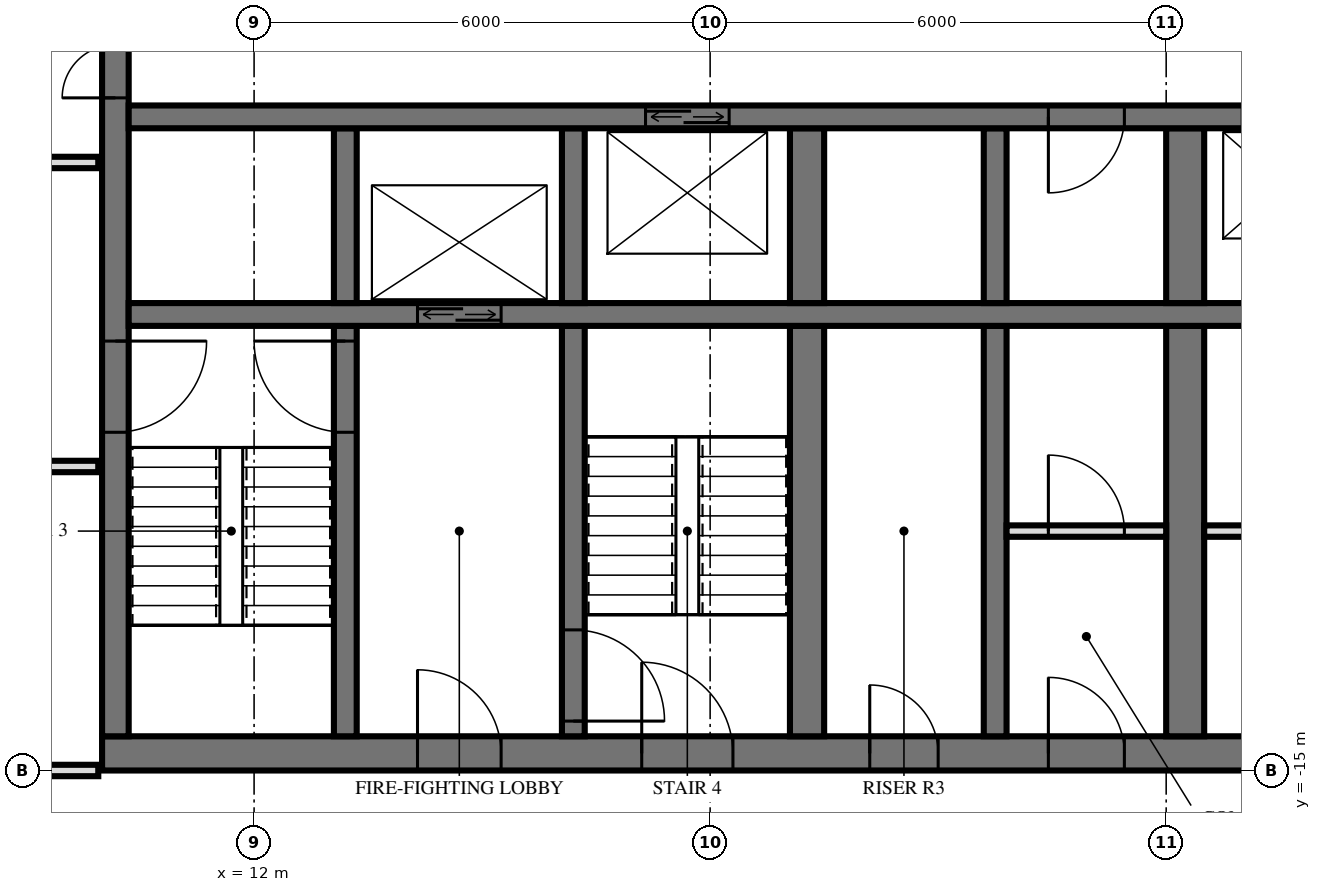
"""IFC4 building model, lengths in metres.
Left out: names, types, materials, properties, quantities, classifications, styles, units other than length and angle.
Written with IfcOpenShell. Run it as: python <this file> out.ifc"""

import sys

from ifc_helpers import new_model, si_unit, direction, frame, frame_2d, origin, place, context, subcontext, project, spatial, rectangle, extrude, element, fill, save


model = new_model("IFC4")
c1 = context("Model", 3, precision=1e-05, world=origin(), true_north=direction((0.0, 1.0)))
c2 = subcontext(c1, "Body", "Model", "MODEL_VIEW")
j1 = project(units=[si_unit("LENGTHUNIT", "METRE"), si_unit("PLANEANGLEUNIT", "RADIAN")], contexts=[c1])
p1 = place(None, origin())
s1 = spatial("IfcSite", under=j1, at=p1, CompositionType="ELEMENT")
p2 = place(p1, origin())
s2 = spatial("IfcBuilding", under=s1, at=p2, CompositionType="ELEMENT")
p3 = place(p2, frame((0.0, 0.0, 27.6)))
s3 = spatial("IfcBuildingStorey", under=s2, at=p3, CompositionType="ELEMENT", Elevation=27.6)
p4 = place(p3, frame((10.0, -14.775, 0.0), z_axis=(0.0, 0.0, 1.0), x_axis=(1.0, 0.0, 0.0)))
e1 = element("IfcWall", 1, at=p4, inside=s3, PredefinedType="SHEAR", context=c2, shape_type="SweptSolid", body=[
    extrude(rectangle(XDim=19.5, YDim=0.45, at=frame_2d((9.75, 0.0))), origin(), (0.0, 0.0, 1.0), 3.6),
])
p5 = place(p4, frame((7.1, 0.0, 0.0)))
e2 = element("IfcOpeningElement", 2, at=p5, cuts=e1, PredefinedType="OPENING", context=c2, shape_type="SweptSolid", body=[
    extrude(rectangle(XDim=1.2, YDim=2.1, at=frame_2d((0.6, 1.05))), frame((0.0, 0.235, 0.0), z_axis=(0.0, -1.0, 0.0), x_axis=(1.0, 0.0, 0.0)), (0.0, 0.0, 1.0), 0.47),
])
p6 = place(p4, frame((4.15, 0.0, 0.0)))
e3 = element("IfcOpeningElement", 3, at=p6, cuts=e1, PredefinedType="OPENING", context=c2, shape_type="SweptSolid", body=[
    extrude(rectangle(XDim=1.1, YDim=2.1, at=frame_2d((0.55, 1.05))), frame((0.0, 0.235, 0.0), z_axis=(0.0, -1.0, 0.0), x_axis=(1.0, 0.0, 0.0)), (0.0, 0.0, 1.0), 0.47),
])
p7 = place(p4, frame((10.1, 0.0, 0.0)))
e4 = element("IfcOpeningElement", 4, at=p7, cuts=e1, PredefinedType="OPENING", context=c2, shape_type="SweptSolid", body=[
    extrude(rectangle(XDim=0.9, YDim=2.1, at=frame_2d((0.45, 1.05))), frame((0.0, 0.235, 0.0), z_axis=(0.0, -1.0, 0.0), x_axis=(1.0, 0.0, 0.0)), (0.0, 0.0, 1.0), 0.47),
])
p8 = place(p4, frame((12.45, 0.0, 0.0)))
e5 = element("IfcOpeningElement", 5, at=p8, cuts=e1, PredefinedType="OPENING", context=c2, shape_type="SweptSolid", body=[
    extrude(rectangle(XDim=1.0, YDim=2.1, at=frame_2d((0.5, 1.05))), frame((0.0, 0.235, 0.0), z_axis=(0.0, -1.0, 0.0), x_axis=(1.0, 0.0, 0.0)), (0.0, 0.0, 1.0), 0.47),
])
p9 = place(p4, frame((16.25, 0.0, 0.0)))
e6 = element("IfcOpeningElement", 6, at=p9, cuts=e1, PredefinedType="OPENING", context=c2, shape_type="SweptSolid", body=[
    extrude(rectangle(XDim=1.0, YDim=2.1, at=frame_2d((0.5, 1.05))), frame((0.0, 0.235, 0.0), z_axis=(0.0, -1.0, 0.0), x_axis=(1.0, 0.0, 0.0)), (0.0, 0.0, 1.0), 0.47),
])
p10 = place(p3, frame((10.175, -14.55, 0.0), z_axis=(0.0, 0.0, 1.0), x_axis=(0.0, 1.0, 0.0)))
e7 = element("IfcWall", 7, at=p10, inside=s3, PredefinedType="SHEAR", context=c2, shape_type="SweptSolid", body=[
    extrude(rectangle(XDim=14.1, YDim=0.35, at=frame_2d((7.05, 0.0))), origin(), (0.0, 0.0, 1.0), 3.6),
])
p11 = place(p10, frame((8.4, 0.0, 0.0)))
e8 = element("IfcOpeningElement", 8, at=p11, cuts=e7, PredefinedType="OPENING", context=c2, shape_type="SweptSolid", body=[
    extrude(rectangle(XDim=1.4, YDim=2.4, at=frame_2d((0.7, 1.2))), frame((0.0, 0.185, 0.0), z_axis=(0.0, -1.0, 0.0), x_axis=(1.0, 0.0, 0.0)), (0.0, 0.0, 1.0), 0.37),
])
p12 = place(p10, frame((10.0, 0.0, 0.0)))
e9 = element("IfcOpeningElement", 9, at=p12, cuts=e7, PredefinedType="OPENING", context=c2, shape_type="SweptSolid", body=[
    extrude(rectangle(XDim=1.4, YDim=2.4, at=frame_2d((0.7, 1.2))), frame((0.0, 0.185, 0.0), z_axis=(0.0, -1.0, 0.0), x_axis=(1.0, 0.0, 0.0)), (0.0, 0.0, 1.0), 0.37),
])
p13 = place(p10, frame((4.0, 0.0, 0.0)))
e10 = element("IfcOpeningElement", 10, at=p13, cuts=e7, PredefinedType="OPENING", context=c2, shape_type="SweptSolid", body=[
    extrude(rectangle(XDim=1.2, YDim=2.1, at=frame_2d((0.6, 1.05))), frame((0.0, 0.185, 0.0), z_axis=(0.0, -1.0, 0.0), x_axis=(1.0, 0.0, 0.0)), (0.0, 0.0, 1.0), 0.37),
])
p14 = place(p3, frame((10.35, -6.4, 0.0), z_axis=(0.0, 0.0, 1.0), x_axis=(1.0, 0.0, 0.0)))
e11 = element("IfcWall", 11, at=p14, inside=s3, PredefinedType="SHEAR", context=c2, shape_type="SweptSolid", body=[
    extrude(rectangle(XDim=18.7, YDim=0.3, at=frame_2d((9.35, 0.0))), origin(), (0.0, 0.0, 1.0), 3.6),
])
p15 = place(p14, frame((14.65, 0.0, 0.0)))
e12 = element("IfcOpeningElement", 12, at=p15, cuts=e11, PredefinedType="OPENING", context=c2, shape_type="SweptSolid", body=[
    extrude(rectangle(XDim=1.1, YDim=2.1, at=frame_2d((0.55, 1.05))), frame((0.0, 0.16, 0.0), z_axis=(0.0, -1.0, 0.0), x_axis=(1.0, 0.0, 0.0)), (0.0, 0.0, 1.0), 0.32),
])
p16 = place(p14, frame((17.05, 0.0, 0.0)))
e13 = element("IfcOpeningElement", 13, at=p16, cuts=e11, PredefinedType="OPENING", context=c2, shape_type="SweptSolid", body=[
    extrude(rectangle(XDim=1.1, YDim=2.1, at=frame_2d((0.55, 1.05))), frame((0.0, 0.16, 0.0), z_axis=(0.0, -1.0, 0.0), x_axis=(1.0, 0.0, 0.0)), (0.0, 0.0, 1.0), 0.32),
])
p17 = place(p14, frame((6.8, 0.0, 0.0)))
e14 = element("IfcOpeningElement", 14, at=p17, cuts=e11, PredefinedType="OPENING", context=c2, shape_type="SweptSolid", body=[
    extrude(rectangle(XDim=1.1, YDim=2.1, at=frame_2d((0.55, 1.05))), frame((0.0, 0.16, 0.0), z_axis=(0.0, -1.0, 0.0), x_axis=(1.0, 0.0, 0.0)), (0.0, 0.0, 1.0), 0.32),
])
p18 = place(p14, frame((12.1, 0.0, 0.0)))
e15 = element("IfcOpeningElement", 15, at=p18, cuts=e11, PredefinedType="OPENING", context=c2, shape_type="SweptSolid", body=[
    extrude(rectangle(XDim=1.0, YDim=2.1, at=frame_2d((0.5, 1.05))), frame((0.0, 0.16, 0.0), z_axis=(0.0, -1.0, 0.0), x_axis=(1.0, 0.0, 0.0)), (0.0, 0.0, 1.0), 0.32),
])
p19 = place(p3, frame((10.35, -9.0, 0.0), z_axis=(0.0, 0.0, 1.0), x_axis=(1.0, 0.0, 0.0)))
e16 = element("IfcWall", 16, at=p19, inside=s3, PredefinedType="SHEAR", context=c2, shape_type="SweptSolid", body=[
    extrude(rectangle(XDim=18.7, YDim=0.3, at=frame_2d((9.35, 0.0))), origin(), (0.0, 0.0, 1.0), 3.6),
])
p20 = place(p19, frame((3.8, 0.0, 0.0)))
e17 = element("IfcOpeningElement", 17, at=p20, cuts=e16, PredefinedType="OPENING", context=c2, shape_type="SweptSolid", body=[
    extrude(rectangle(XDim=1.1, YDim=2.1, at=frame_2d((0.55, 1.05))), frame((0.0, 0.16, 0.0), z_axis=(0.0, -1.0, 0.0), x_axis=(1.0, 0.0, 0.0)), (0.0, 0.0, 1.0), 0.32),
])
p21 = place(p3, frame((13.2, -8.85, 0.0), z_axis=(0.0, 0.0, 1.0), x_axis=(0.0, 1.0, 0.0)))
e18 = element("IfcWall", 18, at=p21, inside=s3, PredefinedType="SHEAR", context=c2, shape_type="SweptSolid", body=[
    extrude(rectangle(XDim=2.3, YDim=0.3, at=frame_2d((1.15, 0.0))), origin(), (0.0, 0.0, 1.0), 3.6),
])
p22 = place(p3, frame((13.2, -14.55, 0.0), z_axis=(0.0, 0.0, 1.0), x_axis=(0.0, 1.0, 0.0)))
e19 = element("IfcWall", 19, at=p22, inside=s3, PredefinedType="SHEAR", context=c2, shape_type="SweptSolid", body=[
    extrude(rectangle(XDim=5.4, YDim=0.3, at=frame_2d((2.7, 0.0))), origin(), (0.0, 0.0, 1.0), 3.6),
])
p23 = place(p22, frame((4.0, 0.0, 0.0)))
e20 = element("IfcOpeningElement", 20, at=p23, cuts=e19, PredefinedType="OPENING", context=c2, shape_type="SweptSolid", body=[
    extrude(rectangle(XDim=1.2, YDim=2.1, at=frame_2d((0.6, 1.05))), frame((0.0, 0.16, 0.0), z_axis=(0.0, -1.0, 0.0), x_axis=(1.0, 0.0, 0.0)), (0.0, 0.0, 1.0), 0.32),
])
p24 = place(p3, frame((16.2, -8.85, 0.0), z_axis=(0.0, 0.0, 1.0), x_axis=(0.0, 1.0, 0.0)))
e21 = element("IfcWall", 21, at=p24, inside=s3, PredefinedType="SHEAR", context=c2, shape_type="SweptSolid", body=[
    extrude(rectangle(XDim=2.3, YDim=0.3, at=frame_2d((1.15, 0.0))), origin(), (0.0, 0.0, 1.0), 3.6),
])
p25 = place(p3, frame((16.2, -14.55, 0.0), z_axis=(0.0, 0.0, 1.0), x_axis=(0.0, 1.0, 0.0)))
e22 = element("IfcWall", 22, at=p25, inside=s3, PredefinedType="SHEAR", context=c2, shape_type="SweptSolid", body=[
    extrude(rectangle(XDim=5.4, YDim=0.3, at=frame_2d((2.7, 0.0))), origin(), (0.0, 0.0, 1.0), 3.6),
])
p26 = place(p25, frame((0.2, 0.0, 0.0)))
e23 = element("IfcOpeningElement", 23, at=p26, cuts=e22, PredefinedType="OPENING", context=c2, shape_type="SweptSolid", body=[
    extrude(rectangle(XDim=1.2, YDim=2.1, at=frame_2d((0.6, 1.05))), frame((0.0, 0.16, 0.0), z_axis=(0.0, -1.0, 0.0), x_axis=(1.0, 0.0, 0.0)), (0.0, 0.0, 1.0), 0.32),
])
p27 = place(p3, frame((19.275, -8.85, 0.0), z_axis=(0.0, 0.0, 1.0), x_axis=(0.0, 1.0, 0.0)))
e24 = element("IfcWall", 24, at=p27, inside=s3, PredefinedType="SHEAR", context=c2, shape_type="SweptSolid", body=[
    extrude(rectangle(XDim=2.3, YDim=0.45, at=frame_2d((1.15, 0.0))), origin(), (0.0, 0.0, 1.0), 3.6),
])
p28 = place(p3, frame((19.275, -14.55, 0.0), z_axis=(0.0, 0.0, 1.0), x_axis=(0.0, 1.0, 0.0)))
e25 = element("IfcWall", 25, at=p28, inside=s3, PredefinedType="SHEAR", context=c2, shape_type="SweptSolid", body=[
    extrude(rectangle(XDim=5.4, YDim=0.45, at=frame_2d((2.7, 0.0))), origin(), (0.0, 0.0, 1.0), 3.6),
])
p29 = place(p3, frame((21.75, -8.85, 0.0), z_axis=(0.0, 0.0, 1.0), x_axis=(0.0, 1.0, 0.0)))
e26 = element("IfcWall", 26, at=p29, inside=s3, PredefinedType="SHEAR", context=c2, shape_type="SweptSolid", body=[
    extrude(rectangle(XDim=2.3, YDim=0.3, at=frame_2d((1.15, 0.0))), origin(), (0.0, 0.0, 1.0), 3.6),
])
p30 = place(p3, frame((21.75, -14.55, 0.0), z_axis=(0.0, 0.0, 1.0), x_axis=(0.0, 1.0, 0.0)))
e27 = element("IfcWall", 27, at=p30, inside=s3, PredefinedType="SHEAR", context=c2, shape_type="SweptSolid", body=[
    extrude(rectangle(XDim=5.4, YDim=0.3, at=frame_2d((2.7, 0.0))), origin(), (0.0, 0.0, 1.0), 3.6),
])
p31 = place(p3, frame((24.25, -8.85, 0.0), z_axis=(0.0, 0.0, 1.0), x_axis=(0.0, 1.0, 0.0)))
e28 = element("IfcWall", 28, at=p31, inside=s3, PredefinedType="SHEAR", context=c2, shape_type="SweptSolid", body=[
    extrude(rectangle(XDim=2.3, YDim=0.5, at=frame_2d((1.15, 0.0))), origin(), (0.0, 0.0, 1.0), 3.6),
])
p32 = place(p3, frame((24.25, -14.55, 0.0), z_axis=(0.0, 0.0, 1.0), x_axis=(0.0, 1.0, 0.0)))
e29 = element("IfcWall", 29, at=p32, inside=s3, PredefinedType="SHEAR", context=c2, shape_type="SweptSolid", body=[
    extrude(rectangle(XDim=5.4, YDim=0.5, at=frame_2d((2.7, 0.0))), origin(), (0.0, 0.0, 1.0), 3.6),
])
p33 = place(p3, frame((21.9, -11.85, 0.0), z_axis=(0.0, 0.0, 1.0), x_axis=(1.0, 0.0, 0.0)))
e30 = element("IfcWall", 30, at=p33, inside=s3, PredefinedType="PARTITIONING", context=c2, shape_type="SweptSolid", body=[
    extrude(rectangle(XDim=2.1, YDim=0.15, at=frame_2d((1.05, 0.0))), origin(), (0.0, 0.0, 1.0), 3.3),
])
p34 = place(p33, frame((0.55, 0.0, 0.0)))
e31 = element("IfcOpeningElement", 31, at=p34, cuts=e30, PredefinedType="OPENING", context=c2, shape_type="SweptSolid", body=[
    extrude(rectangle(XDim=1.0, YDim=2.1, at=frame_2d((0.5, 1.05))), frame((0.0, 0.085, 0.0), z_axis=(0.0, -1.0, 0.0), x_axis=(1.0, 0.0, 0.0)), (0.0, 0.0, 1.0), 0.17),
])
p35 = place(p3, frame((24.5, -11.85, 0.0), z_axis=(0.0, 0.0, 1.0), x_axis=(1.0, 0.0, 0.0)))
e32 = element("IfcWall", 32, at=p35, inside=s3, PredefinedType="PARTITIONING", context=c2, shape_type="SweptSolid", body=[
    extrude(rectangle(XDim=4.5, YDim=0.15, at=frame_2d((2.25, 0.0))), origin(), (0.0, 0.0, 1.0), 3.3),
])
p36 = place(p35, frame((1.75, 0.0, 0.0)))
e33 = element("IfcOpeningElement", 33, at=p36, cuts=e32, PredefinedType="OPENING", context=c2, shape_type="SweptSolid", body=[
    extrude(rectangle(XDim=1.0, YDim=2.1, at=frame_2d((0.5, 1.05))), frame((0.0, 0.085, 0.0), z_axis=(0.0, -1.0, 0.0), x_axis=(1.0, 0.0, 0.0)), (0.0, 0.0, 1.0), 0.17),
])
p37 = place(p3, frame((-9.95, -15.0, 0.0), z_axis=(0.0, 0.0, 1.0), x_axis=(1.0, 0.0, 0.0)))
e34 = element("IfcWall", 34, at=p37, inside=s3, PredefinedType="PARTITIONING", context=c2, shape_type="SweptSolid", body=[
    extrude(rectangle(XDim=19.9, YDim=0.15, at=frame_2d((9.95, 0.0))), origin(), (0.0, 0.0, 1.0), 2.684),
])
p38 = place(p37, frame((9.45, 0.0, 0.0)))
e35 = element("IfcOpeningElement", 35, at=p38, cuts=e34, PredefinedType="OPENING", context=c2, shape_type="SweptSolid", body=[
    extrude(rectangle(XDim=1.0, YDim=2.1, at=frame_2d((0.5, 1.05))), frame((0.0, 0.085, 0.0), z_axis=(0.0, -1.0, 0.0), x_axis=(1.0, 0.0, 0.0)), (0.0, 0.0, 1.0), 0.17),
])
p39 = place(p3, frame((-9.95, -11.0, 0.0), z_axis=(0.0, 0.0, 1.0), x_axis=(1.0, 0.0, 0.0)))
e36 = element("IfcWall", 36, at=p39, inside=s3, PredefinedType="PARTITIONING", context=c2, shape_type="SweptSolid", body=[
    extrude(rectangle(XDim=19.9, YDim=0.15, at=frame_2d((9.95, 0.0))), origin(), (0.0, 0.0, 1.0), 3.32),
])
p40 = place(p39, frame((9.45, 0.0, 0.0)))
e37 = element("IfcOpeningElement", 37, at=p40, cuts=e36, PredefinedType="OPENING", context=c2, shape_type="SweptSolid", body=[
    extrude(rectangle(XDim=1.0, YDim=2.1, at=frame_2d((0.5, 1.05))), frame((0.0, 0.085, 0.0), z_axis=(0.0, -1.0, 0.0), x_axis=(1.0, 0.0, 0.0)), (0.0, 0.0, 1.0), 0.17),
])
p41 = place(p39, frame((15.45, 0.0, 0.0)))
e38 = element("IfcOpeningElement", 38, at=p41, cuts=e36, PredefinedType="OPENING", context=c2, shape_type="SweptSolid", body=[
    extrude(rectangle(XDim=1.0, YDim=2.1, at=frame_2d((0.5, 1.05))), frame((0.0, 0.085, 0.0), z_axis=(0.0, -1.0, 0.0), x_axis=(1.0, 0.0, 0.0)), (0.0, 0.0, 1.0), 0.17),
])
p42 = place(p3, frame((-9.95, -7.0, 0.0), z_axis=(0.0, 0.0, 1.0), x_axis=(1.0, 0.0, 0.0)))
e39 = element("IfcWall", 39, at=p42, inside=s3, PredefinedType="PARTITIONING", context=c2, shape_type="SweptSolid", body=[
    extrude(rectangle(XDim=19.9, YDim=0.15, at=frame_2d((9.95, 0.0))), origin(), (0.0, 0.0, 1.0), 3.32),
])
p43 = place(p42, frame((9.45, 0.0, 0.0)))
e40 = element("IfcOpeningElement", 40, at=p43, cuts=e39, PredefinedType="OPENING", context=c2, shape_type="SweptSolid", body=[
    extrude(rectangle(XDim=1.0, YDim=2.1, at=frame_2d((0.5, 1.05))), frame((0.0, 0.085, 0.0), z_axis=(0.0, -1.0, 0.0), x_axis=(1.0, 0.0, 0.0)), (0.0, 0.0, 1.0), 0.17),
])
p44 = place(p42, frame((3.45, 0.0, 0.0)))
e41 = element("IfcOpeningElement", 41, at=p44, cuts=e39, PredefinedType="OPENING", context=c2, shape_type="SweptSolid", body=[
    extrude(rectangle(XDim=1.0, YDim=2.1, at=frame_2d((0.5, 1.05))), frame((0.0, 0.085, 0.0), z_axis=(0.0, -1.0, 0.0), x_axis=(1.0, 0.0, 0.0)), (0.0, 0.0, 1.0), 0.17),
])
p45 = place(p20, origin())
e42 = element("IfcDoor", 42, at=p45, inside=s3, OperationType="DOUBLE_DOOR_SLIDING", PredefinedType="USERDEFINED", context=c2, shape_type="SweptSolid", body=[
    extrude(rectangle(XDim=1.1, YDim=2.1, at=frame_2d((0.55, 1.05))), frame((0.0, 0.025, 0.0), z_axis=(0.0, -1.0, 0.0), x_axis=(1.0, 0.0, 0.0)), (0.0, 0.0, 1.0), 0.05),
])
fill(e17, e42)
p46 = place(p17, origin())
e43 = element("IfcDoor", 43, at=p46, inside=s3, OperationType="DOUBLE_DOOR_SLIDING", PredefinedType="USERDEFINED", context=c2, shape_type="SweptSolid", body=[
    extrude(rectangle(XDim=1.1, YDim=2.1, at=frame_2d((0.55, 1.05))), frame((0.0, 0.025, 0.0), z_axis=(0.0, -1.0, 0.0), x_axis=(1.0, 0.0, 0.0)), (0.0, 0.0, 1.0), 0.05),
])
fill(e14, e43)
p47 = place(p11, origin())
e44 = element("IfcDoor", 44, at=p47, inside=s3, OperationType="DOUBLE_DOOR_SINGLE_SWING", PredefinedType="DOOR", context=c2, shape_type="SweptSolid", body=[
    extrude(rectangle(XDim=1.4, YDim=2.4, at=frame_2d((0.7, 1.2))), frame((0.0, 0.025, 0.0), z_axis=(0.0, -1.0, 0.0), x_axis=(1.0, 0.0, 0.0)), (0.0, 0.0, 1.0), 0.05),
])
fill(e8, e44)
p48 = place(p13, frame((0.6, 0.0, 0.0), z_axis=(0.0, 0.0, 1.0), x_axis=(-1.0, 0.0, 0.0)))
e45 = element("IfcDoor", 45, at=p48, inside=s3, OperationType="SINGLE_SWING_RIGHT", PredefinedType="DOOR", context=c2, shape_type="SweptSolid", body=[
    extrude(rectangle(XDim=1.2, YDim=2.1, at=frame_2d((0.0, 1.05))), frame((0.0, -0.025, 0.0), z_axis=(0.0, 1.0, 0.0), x_axis=(-1.0, 0.0, 0.0)), (0.0, 0.0, 1.0), 0.05),
])
fill(e10, e45)
p49 = place(p5, origin())
e46 = element("IfcDoor", 46, at=p49, inside=s3, OperationType="SINGLE_SWING_RIGHT", PredefinedType="DOOR", context=c2, shape_type="SweptSolid", body=[
    extrude(rectangle(XDim=1.2, YDim=2.1, at=frame_2d((0.6, 1.05))), frame((0.0, 0.025, 0.0), z_axis=(0.0, -1.0, 0.0), x_axis=(1.0, 0.0, 0.0)), (0.0, 0.0, 1.0), 0.05),
])
fill(e2, e46)
p50 = place(p6, origin())
e47 = element("IfcDoor", 47, at=p50, inside=s3, OperationType="SINGLE_SWING_RIGHT", PredefinedType="DOOR", context=c2, shape_type="SweptSolid", body=[
    extrude(rectangle(XDim=1.1, YDim=2.1, at=frame_2d((0.55, 1.05))), frame((0.0, 0.025, 0.0), z_axis=(0.0, -1.0, 0.0), x_axis=(1.0, 0.0, 0.0)), (0.0, 0.0, 1.0), 0.05),
])
fill(e3, e47)
p51 = place(p7, origin())
e48 = element("IfcDoor", 48, at=p51, inside=s3, OperationType="SINGLE_SWING_RIGHT", PredefinedType="DOOR", context=c2, shape_type="SweptSolid", body=[
    extrude(rectangle(XDim=0.9, YDim=2.1, at=frame_2d((0.45, 1.05))), frame((0.0, 0.025, 0.0), z_axis=(0.0, -1.0, 0.0), x_axis=(1.0, 0.0, 0.0)), (0.0, 0.0, 1.0), 0.05),
])
fill(e4, e48)
p52 = place(p8, origin())
e49 = element("IfcDoor", 49, at=p52, inside=s3, OperationType="SINGLE_SWING_RIGHT", PredefinedType="DOOR", context=c2, shape_type="SweptSolid", body=[
    extrude(rectangle(XDim=1.0, YDim=2.1, at=frame_2d((0.5, 1.05))), frame((0.0, 0.025, 0.0), z_axis=(0.0, -1.0, 0.0), x_axis=(1.0, 0.0, 0.0)), (0.0, 0.0, 1.0), 0.05),
])
fill(e5, e49)
p53 = place(p18, frame((0.5, 0.0, 0.0), z_axis=(0.0, 0.0, 1.0), x_axis=(-1.0, 0.0, 0.0)))
e50 = element("IfcDoor", 50, at=p53, inside=s3, OperationType="SINGLE_SWING_LEFT", PredefinedType="DOOR", context=c2, shape_type="SweptSolid", body=[
    extrude(rectangle(XDim=1.0, YDim=2.1, at=frame_2d((0.0, 1.05))), frame((0.0, -0.025, 0.0), z_axis=(0.0, 1.0, 0.0), x_axis=(-1.0, 0.0, 0.0)), (0.0, 0.0, 1.0), 0.05),
])
fill(e15, e50)
p54 = place(p23, origin())
e51 = element("IfcDoor", 51, at=p54, inside=s3, OperationType="SINGLE_SWING_LEFT", PredefinedType="DOOR", context=c2, shape_type="SweptSolid", body=[
    extrude(rectangle(XDim=1.2, YDim=2.1, at=frame_2d((0.6, 1.05))), frame((0.0, 0.025, 0.0), z_axis=(0.0, -1.0, 0.0), x_axis=(1.0, 0.0, 0.0)), (0.0, 0.0, 1.0), 0.05),
])
fill(e20, e51)
p55 = place(p26, frame((0.6, 0.0, 0.0), z_axis=(0.0, 0.0, 1.0), x_axis=(-1.0, 0.0, 0.0)))
e52 = element("IfcDoor", 52, at=p55, inside=s3, OperationType="SINGLE_SWING_LEFT", PredefinedType="DOOR", context=c2, shape_type="SweptSolid", body=[
    extrude(rectangle(XDim=1.2, YDim=2.1, at=frame_2d((0.0, 1.05))), frame((0.0, -0.025, 0.0), z_axis=(0.0, 1.0, 0.0), x_axis=(-1.0, 0.0, 0.0)), (0.0, 0.0, 1.0), 0.05),
])
fill(e23, e52)
p56 = place(p34, origin())
e53 = element("IfcDoor", 53, at=p56, inside=s3, OperationType="SINGLE_SWING_RIGHT", PredefinedType="DOOR", context=c2, shape_type="SweptSolid", body=[
    extrude(rectangle(XDim=1.0, YDim=2.1, at=frame_2d((0.5, 1.05))), frame((0.0, 0.025, 0.0), z_axis=(0.0, -1.0, 0.0), x_axis=(1.0, 0.0, 0.0)), (0.0, 0.0, 1.0), 0.05),
])
fill(e31, e53)
save(model, sys.argv[1])
